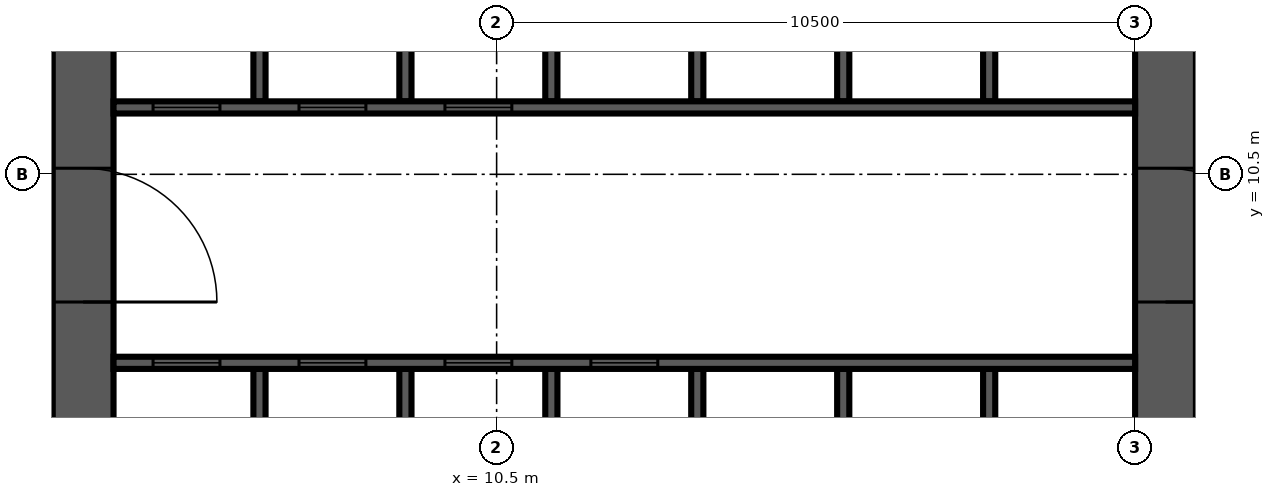
"""IFC4 building model, lengths in metres.
Left out: names, types, materials, properties, quantities, classifications, styles, units other than length and angle.
Written with IfcOpenShell. Run it as: python <this file> out.ifc"""

import sys

from ifc_helpers import new_model, si_unit, direction, frame, frame_2d, origin, place, context, subcontext, project, spatial, rectangle, extrude, source, transform, mapped, element, fill, save


model = new_model("IFC4")
c1 = context("Model", 3, precision=1e-05, world=origin(), true_north=direction((0.0, 1.0)))
c2 = subcontext(c1, "Body", "Model", "MODEL_VIEW")
j1 = project(units=[si_unit("LENGTHUNIT", "METRE"), si_unit("PLANEANGLEUNIT", "RADIAN")], contexts=[c1])
p1 = place(None, origin())
s1 = spatial("IfcSite", under=j1, at=p1, CompositionType="ELEMENT")
p2 = place(p1, origin())
s2 = spatial("IfcBuilding", under=s1, at=p2, CompositionType="ELEMENT")
p3 = place(p2, frame((0.0, 0.0, 137.1)))
s3 = spatial("IfcBuildingStorey", under=s2, at=p3, CompositionType="ELEMENT", Elevation=137.1)
m1 = source(origin(), c2, "Body", "SweptSolid", [
    extrude(rectangle(XDim=17.8, YDim=1.0, at=frame_2d((8.9, 0.0))), origin(), (0.0, 0.0, 1.0), 4.2),
])
p4 = place(p3, frame((3.7, 4.2, 0.0), z_axis=(0.0, 0.0, 1.0), x_axis=(0.0, 1.0, 0.0)))
e1 = element("IfcWall", 1, at=p4, inside=s3, PredefinedType="SHEAR", context=c2, shape_type="MappedRepresentation", body=[
    mapped(m1, transform((0.0, 0.0, 0.0), scale=1.0)),
])
m2 = source(origin(), c2, "Body", "SweptSolid", [
    extrude(rectangle(XDim=2.2, YDim=2.1, at=frame_2d((1.1, 1.05))), frame((0.0, 0.51, 0.0), z_axis=(0.0, -1.0, 0.0), x_axis=(1.0, 0.0, 0.0)), (0.0, 0.0, 1.0), 1.02),
])
p5 = place(p4, frame((4.2, 0.0, 0.0)))
e2 = element("IfcOpeningElement", 2, at=p5, cuts=e1, PredefinedType="OPENING", context=c2, shape_type="MappedRepresentation", body=[
    mapped(m2, transform((0.0, 0.0, 0.0), scale=1.0)),
])
m3 = source(origin(), c2, "Body", "SweptSolid", [
    extrude(rectangle(XDim=0.9, YDim=2.1, at=frame_2d((0.45, 1.05))), frame((0.0, 0.51, 0.0), z_axis=(0.0, -1.0, 0.0), x_axis=(1.0, 0.0, 0.0)), (0.0, 0.0, 1.0), 1.02),
])
p6 = place(p4, frame((10.95, 0.0, 0.0)))
e3 = element("IfcOpeningElement", 3, at=p6, cuts=e1, PredefinedType="OPENING", context=c2, shape_type="MappedRepresentation", body=[
    mapped(m3, transform((0.0, 0.0, 0.0), scale=1.0)),
])
m4 = source(origin(), c2, "Body", "SweptSolid", [
    extrude(rectangle(XDim=16.8, YDim=1.0, at=frame_2d((8.4, 0.0))), origin(), (0.0, 0.0, 1.0), 4.2),
])
p7 = place(p3, frame((21.5, 4.2, 0.0), z_axis=(0.0, 0.0, 1.0), x_axis=(0.0, 1.0, 0.0)))
e4 = element("IfcWall", 4, at=p7, inside=s3, PredefinedType="SHEAR", context=c2, shape_type="MappedRepresentation", body=[
    mapped(m4, transform((0.0, 0.0, 0.0), scale=1.0)),
])
p8 = place(p7, frame((4.2, 0.0, 0.0)))
e5 = element("IfcOpeningElement", 5, at=p8, cuts=e4, PredefinedType="OPENING", context=c2, shape_type="MappedRepresentation", body=[
    mapped(m2, transform((0.0, 0.0, 0.0), scale=1.0)),
])
m5 = source(origin(), c2, "Body", "SweptSolid", [
    extrude(rectangle(XDim=1.2, YDim=2.1, at=frame_2d((0.6, 1.05))), frame((0.0, 0.51, 0.0), z_axis=(0.0, -1.0, 0.0), x_axis=(1.0, 0.0, 0.0)), (0.0, 0.0, 1.0), 1.02),
])
p9 = place(p7, frame((14.7, 0.0, 0.0)))
e6 = element("IfcOpeningElement", 6, at=p9, cuts=e4, PredefinedType="OPENING", context=c2, shape_type="MappedRepresentation", body=[
    mapped(m5, transform((0.0, 0.0, 0.0), scale=1.0)),
])
m6 = source(origin(), c2, "Body", "SweptSolid", [
    extrude(rectangle(XDim=3.1, YDim=0.2, at=frame_2d((1.55, 0.0))), origin(), (0.0, 0.0, 1.0), 4.2),
])
for number, where, z_axis, x_axis in (
    (7, (6.6, 4.2, 0.0), (0.0, 0.0, 1.0), (0.0, 1.0, 0.0)),
    (8, (9.0, 4.2, 0.0), (0.0, 0.0, 1.0), (0.0, 1.0, 0.0)),
    (9, (11.4, 4.2, 0.0), (0.0, 0.0, 1.0), (0.0, 1.0, 0.0)),
    (10, (13.8, 4.2, 0.0), (0.0, 0.0, 1.0), (0.0, 1.0, 0.0)),
    (11, (16.2, 4.2, 0.0), (0.0, 0.0, 1.0), (0.0, 1.0, 0.0)),
    (12, (18.6, 4.2, 0.0), (0.0, 0.0, 1.0), (0.0, 1.0, 0.0)),
):
    element("IfcWall", number, at=place(p3, frame(where, z_axis=z_axis, x_axis=x_axis)), inside=s3, PredefinedType="SOLIDWALL", context=c2, shape_type="MappedRepresentation", body=[
        mapped(m6, transform((0.0, 0.0, 0.0), scale=1.0)),
    ])
m7 = source(origin(), c2, "Body", "SweptSolid", [
    extrude(rectangle(XDim=3.0, YDim=0.2, at=frame_2d((1.5, 0.0))), origin(), (0.0, 0.0, 1.0), 4.2),
])
for number, where, z_axis, x_axis in (
    (13, (6.6, 11.7, 0.0), (0.0, 0.0, 1.0), (0.0, 1.0, 0.0)),
    (14, (9.0, 11.7, 0.0), (0.0, 0.0, 1.0), (0.0, 1.0, 0.0)),
    (15, (11.4, 11.7, 0.0), (0.0, 0.0, 1.0), (0.0, 1.0, 0.0)),
    (16, (13.8, 11.7, 0.0), (0.0, 0.0, 1.0), (0.0, 1.0, 0.0)),
    (17, (16.2, 11.7, 0.0), (0.0, 0.0, 1.0), (0.0, 1.0, 0.0)),
    (18, (18.6, 11.7, 0.0), (0.0, 0.0, 1.0), (0.0, 1.0, 0.0)),
):
    element("IfcWall", number, at=place(p3, frame(where, z_axis=z_axis, x_axis=x_axis)), inside=s3, PredefinedType="SOLIDWALL", context=c2, shape_type="MappedRepresentation", body=[
        mapped(m7, transform((0.0, 0.0, 0.0), scale=1.0)),
    ])
m8 = source(origin(), c2, "Body", "SweptSolid", [
    extrude(rectangle(XDim=16.8, YDim=0.2, at=frame_2d((8.4, 0.0))), origin(), (0.0, 0.0, 1.0), 4.2),
])
p10 = place(p3, frame((4.2, 7.4, 0.0), z_axis=(0.0, 0.0, 1.0), x_axis=(1.0, 0.0, 0.0)))
e19 = element("IfcWall", 19, at=p10, inside=s3, PredefinedType="SOLIDWALL", context=c2, shape_type="MappedRepresentation", body=[
    mapped(m8, transform((0.0, 0.0, 0.0), scale=1.0)),
])
m9 = source(origin(), c2, "Body", "SweptSolid", [
    extrude(rectangle(XDim=1.1, YDim=2.1, at=frame_2d((0.55, 1.05))), frame((0.0, 0.11, 0.0), z_axis=(0.0, -1.0, 0.0), x_axis=(1.0, 0.0, 0.0)), (0.0, 0.0, 1.0), 0.22),
])
p11 = place(p10, frame((0.65, 0.0, 0.0)))
e20 = element("IfcOpeningElement", 20, at=p11, cuts=e19, PredefinedType="OPENING", context=c2, shape_type="MappedRepresentation", body=[
    mapped(m9, transform((0.0, 0.0, 0.0), scale=1.0)),
])
p12 = place(p10, frame((3.05, 0.0, 0.0)))
e21 = element("IfcOpeningElement", 21, at=p12, cuts=e19, PredefinedType="OPENING", context=c2, shape_type="MappedRepresentation", body=[
    mapped(m9, transform((0.0, 0.0, 0.0), scale=1.0)),
])
p13 = place(p10, frame((5.45, 0.0, 0.0)))
e22 = element("IfcOpeningElement", 22, at=p13, cuts=e19, PredefinedType="OPENING", context=c2, shape_type="MappedRepresentation", body=[
    mapped(m9, transform((0.0, 0.0, 0.0), scale=1.0)),
])
p14 = place(p10, frame((7.85, 0.0, 0.0)))
e23 = element("IfcOpeningElement", 23, at=p14, cuts=e19, PredefinedType="OPENING", context=c2, shape_type="MappedRepresentation", body=[
    mapped(m9, transform((0.0, 0.0, 0.0), scale=1.0)),
])
p15 = place(p3, frame((4.2, 11.6, 0.0), z_axis=(0.0, 0.0, 1.0), x_axis=(1.0, 0.0, 0.0)))
e24 = element("IfcWall", 24, at=p15, inside=s3, PredefinedType="SOLIDWALL", context=c2, shape_type="MappedRepresentation", body=[
    mapped(m8, transform((0.0, 0.0, 0.0), scale=1.0)),
])
p16 = place(p15, frame((0.65, 0.0, 0.0)))
e25 = element("IfcOpeningElement", 25, at=p16, cuts=e24, PredefinedType="OPENING", context=c2, shape_type="MappedRepresentation", body=[
    mapped(m9, transform((0.0, 0.0, 0.0), scale=1.0)),
])
p17 = place(p15, frame((3.05, 0.0, 0.0)))
e26 = element("IfcOpeningElement", 26, at=p17, cuts=e24, PredefinedType="OPENING", context=c2, shape_type="MappedRepresentation", body=[
    mapped(m9, transform((0.0, 0.0, 0.0), scale=1.0)),
])
p18 = place(p15, frame((5.45, 0.0, 0.0)))
e27 = element("IfcOpeningElement", 27, at=p18, cuts=e24, PredefinedType="OPENING", context=c2, shape_type="MappedRepresentation", body=[
    mapped(m9, transform((0.0, 0.0, 0.0), scale=1.0)),
])
m10 = source(origin(), c2, "Body", "SweptSolid", [
    extrude(rectangle(XDim=1.1, YDim=2.1, at=frame_2d((0.55, 1.05))), frame((0.0, 0.025, 0.0), z_axis=(0.0, -1.0, 0.0), x_axis=(1.0, 0.0, 0.0)), (0.0, 0.0, 1.0), 0.05),
])
p19 = place(p11, origin())
e28 = element("IfcDoor", 28, at=p19, inside=s3, OperationType="SLIDING_TO_LEFT", PredefinedType="DOOR", context=c2, shape_type="MappedRepresentation", body=[
    mapped(m10, transform((0.0, 0.0, 0.0), scale=1.0)),
])
fill(e20, e28)
p20 = place(p12, origin())
e29 = element("IfcDoor", 29, at=p20, inside=s3, OperationType="SLIDING_TO_LEFT", PredefinedType="DOOR", context=c2, shape_type="MappedRepresentation", body=[
    mapped(m10, transform((0.0, 0.0, 0.0), scale=1.0)),
])
fill(e21, e29)
p21 = place(p13, origin())
e30 = element("IfcDoor", 30, at=p21, inside=s3, OperationType="SLIDING_TO_LEFT", PredefinedType="DOOR", context=c2, shape_type="MappedRepresentation", body=[
    mapped(m10, transform((0.0, 0.0, 0.0), scale=1.0)),
])
fill(e22, e30)
p22 = place(p14, origin())
e31 = element("IfcDoor", 31, at=p22, inside=s3, OperationType="SLIDING_TO_LEFT", PredefinedType="DOOR", context=c2, shape_type="MappedRepresentation", body=[
    mapped(m10, transform((0.0, 0.0, 0.0), scale=1.0)),
])
fill(e23, e31)
p23 = place(p16, origin())
e32 = element("IfcDoor", 32, at=p23, inside=s3, OperationType="SLIDING_TO_LEFT", PredefinedType="DOOR", context=c2, shape_type="MappedRepresentation", body=[
    mapped(m10, transform((0.0, 0.0, 0.0), scale=1.0)),
])
fill(e25, e32)
p24 = place(p17, origin())
e33 = element("IfcDoor", 33, at=p24, inside=s3, OperationType="SLIDING_TO_LEFT", PredefinedType="DOOR", context=c2, shape_type="MappedRepresentation", body=[
    mapped(m10, transform((0.0, 0.0, 0.0), scale=1.0)),
])
fill(e26, e33)
p25 = place(p18, origin())
e34 = element("IfcDoor", 34, at=p25, inside=s3, OperationType="SLIDING_TO_LEFT", PredefinedType="DOOR", context=c2, shape_type="MappedRepresentation", body=[
    mapped(m10, transform((0.0, 0.0, 0.0), scale=1.0)),
])
fill(e27, e34)
m11 = source(origin(), c2, "Body", "SweptSolid", [
    extrude(rectangle(XDim=2.2, YDim=2.1, at=frame_2d((1.1, 1.05))), frame((0.0, 0.025, 0.0), z_axis=(0.0, -1.0, 0.0), x_axis=(1.0, 0.0, 0.0)), (0.0, 0.0, 1.0), 0.05),
])
p26 = place(p8, origin())
e35 = element("IfcDoor", 35, at=p26, inside=s3, OperationType="DOUBLE_DOOR_SINGLE_SWING", PredefinedType="DOOR", context=c2, shape_type="MappedRepresentation", body=[
    mapped(m11, transform((0.0, 0.0, 0.0), scale=1.0)),
])
fill(e5, e35)
p27 = place(p5, origin())
e36 = element("IfcDoor", 36, at=p27, inside=s3, OperationType="DOUBLE_DOOR_SINGLE_SWING", PredefinedType="DOOR", context=c2, shape_type="MappedRepresentation", body=[
    mapped(m11, transform((0.0, 0.0, 0.0), scale=1.0)),
])
fill(e2, e36)
save(model, sys.argv[1])
